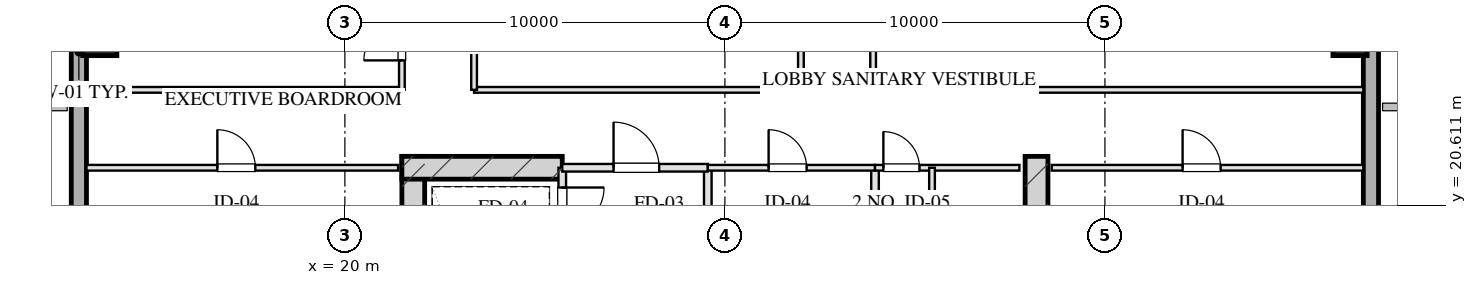
"""IFC4 building model, lengths in metres.
Left out: names, types, materials, properties, quantities, classifications, styles, units other than length and angle.
Written with IfcOpenShell. Run it as: python <this file> out.ifc"""

import sys

from ifc_helpers import new_model, si_unit, direction, frame, frame_2d, origin, origin_2d, place, context, subcontext, project, spatial, rectangle, hollow_rectangle, extrude, element, fill, save


model = new_model("IFC4")
c1 = context("Model", 3, precision=1e-05, world=origin(), true_north=direction((0.0, 1.0)))
c2 = subcontext(c1, "Body", "Model", "MODEL_VIEW")
j1 = project(units=[si_unit("LENGTHUNIT", "METRE"), si_unit("PLANEANGLEUNIT", "RADIAN")], contexts=[c1])
p1 = place(None, origin())
s1 = spatial("IfcSite", under=j1, at=p1, CompositionType="ELEMENT")
p2 = place(p1, origin())
s2 = spatial("IfcBuilding", under=s1, at=p2, CompositionType="ELEMENT")
p3 = place(p2, frame((0.0, 0.0, 163.3)))
s3 = spatial("IfcBuildingStorey", under=s2, at=p3, CompositionType="ELEMENT", Elevation=163.3)
for number, where, z_axis, x_axis in (
    (1, (21.8, 21.9, 0.0), (0.0, 0.0, 1.0), (0.0, -1.0, 0.0)),
    (2, (38.2, 21.9, 0.0), (0.0, 0.0, 1.0), (0.0, -1.0, 0.0)),
):
    element("IfcWall", number, at=place(p3, frame(where, z_axis=z_axis, x_axis=x_axis)), inside=s3, PredefinedType="SHEAR", context=c2, shape_type="SweptSolid", body=[
        extrude(rectangle(XDim=9.48, YDim=0.6, at=frame_2d((4.74, 0.0))), origin(), (0.0, 0.0, 1.0), 3.45),
    ])
p4 = place(p3, frame((21.5, 21.6, 0.0), z_axis=(0.0, 0.0, 1.0), x_axis=(1.0, 0.0, 0.0)))
e3 = element("IfcWall", 3, at=p4, inside=s3, PredefinedType="SHEAR", context=c2, shape_type="SweptSolid", body=[
    extrude(rectangle(XDim=4.22, YDim=0.6, at=frame_2d((2.11, 0.0))), origin(), (0.0, 0.0, 1.0), 3.45),
])
for number, where, z_axis, x_axis in (
    (4, (13.55, 25.0, 0.0), (0.0, 0.0, 1.0), (1.0, 0.0, 0.0)),
    (5, (46.45, 25.0, 0.0), (0.0, 0.0, 1.0), (1.0, 0.0, 0.0)),
):
    element("IfcColumn", number, at=place(p3, frame(where, z_axis=z_axis, x_axis=x_axis)), inside=s3, PredefinedType="COLUMN", context=c2, shape_type="SweptSolid", body=[
        extrude(hollow_rectangle(XDim=0.9, YDim=0.9, WallThickness=0.032, at=origin_2d()), origin(), (0.0, 0.0, 1.0), 3.451),
    ])
p5 = place(p3, frame((13.0, 10.8, 0.0), z_axis=(0.0, 0.0, 1.0), x_axis=(0.0, 1.0, 0.0)))
e6 = element("IfcWall", 6, at=p5, inside=s3, PredefinedType="SOLIDWALL", context=c2, shape_type="SweptSolid", body=[
    extrude(rectangle(XDim=46.4, YDim=0.4, at=frame_2d((23.2, 0.0))), origin(), (0.0, 0.0, 1.0), 2.61),
])
p6 = place(p5, frame((28.45, 0.0, 0.0)))
e7 = element("IfcOpeningElement", 7, at=p6, cuts=e6, PredefinedType="OPENING", context=c2, shape_type="SweptSolid", body=[
    extrude(rectangle(XDim=1.1, YDim=2.15, at=frame_2d((0.55, 1.075))), frame((0.0, 0.21, 0.0), z_axis=(0.0, -1.0, 0.0), x_axis=(1.0, 0.0, 0.0)), (0.0, 0.0, 1.0), 0.42),
])
p7 = place(p3, frame((47.0, 57.2, 0.0), z_axis=(0.0, 0.0, 1.0), x_axis=(0.0, -1.0, 0.0)))
e8 = element("IfcWall", 8, at=p7, inside=s3, PredefinedType="SOLIDWALL", context=c2, shape_type="SweptSolid", body=[
    extrude(rectangle(XDim=46.4, YDim=0.4, at=frame_2d((23.2, 0.0))), origin(), (0.0, 0.0, 1.0), 2.61),
])
p8 = place(p7, frame((28.475, 0.0, 0.75)))
e9 = element("IfcOpeningElement", 9, at=p8, cuts=e8, PredefinedType="OPENING", context=c2, shape_type="SweptSolid", body=[
    extrude(rectangle(XDim=2.25, YDim=1.46, at=frame_2d((1.125, 0.73))), frame((0.0, 0.21, 0.0), z_axis=(0.0, -1.0, 0.0), x_axis=(1.0, 0.0, 0.0)), (0.0, 0.0, 1.0), 0.42),
])
p9 = place(p7, frame((24.675, 0.0, 0.75)))
e10 = element("IfcOpeningElement", 10, at=p9, cuts=e8, PredefinedType="OPENING", context=c2, shape_type="SweptSolid", body=[
    extrude(rectangle(XDim=2.25, YDim=1.46, at=frame_2d((1.125, 0.73))), frame((0.0, 0.21, 0.0), z_axis=(0.0, -1.0, 0.0), x_axis=(1.0, 0.0, 0.0)), (0.0, 0.0, 1.0), 0.42),
])
p10 = place(p7, frame((18.25, 0.0, 0.0)))
e11 = element("IfcOpeningElement", 11, at=p10, cuts=e8, PredefinedType="OPENING", context=c2, shape_type="SweptSolid", body=[
    extrude(rectangle(XDim=1.1, YDim=2.15, at=frame_2d((0.55, 1.075))), frame((0.0, 0.21, 0.0), z_axis=(0.0, -1.0, 0.0), x_axis=(1.0, 0.0, 0.0)), (0.0, 0.0, 1.0), 0.42),
])
p11 = place(p3, frame((25.72, 21.6, 0.0), z_axis=(0.0, 0.0, 1.0), x_axis=(0.0, -1.0, 0.0)))
e12 = element("IfcWall", 12, at=p11, inside=s3, PredefinedType="PARTITIONING", context=c2, shape_type="SweptSolid", body=[
    extrude(rectangle(XDim=1.9, YDim=0.2, at=frame_2d((0.95, 0.0))), origin(), (0.0, 0.0, 1.0), 3.175),
])
p12 = place(p11, frame((0.52, 0.0, 0.0)))
e13 = element("IfcOpeningElement", 13, at=p12, cuts=e12, PredefinedType="OPENING", context=c2, shape_type="SweptSolid", body=[
    extrude(rectangle(XDim=1.1, YDim=2.05, at=frame_2d((0.55, 1.025))), frame((0.0, 0.11, 0.0), z_axis=(0.0, -1.0, 0.0), x_axis=(1.0, 0.0, 0.0)), (0.0, 0.0, 1.0), 0.22),
])
p13 = place(p3, frame((29.55, 21.6, 0.0), z_axis=(0.0, 0.0, 1.0), x_axis=(0.0, -1.0, 0.0)))
e14 = element("IfcWall", 14, at=p13, inside=s3, PredefinedType="PARTITIONING", context=c2, shape_type="SweptSolid", body=[
    extrude(rectangle(XDim=8.43, YDim=0.2, at=frame_2d((4.215, 0.0))), origin(), (0.0, 0.0, 1.0), 3.175),
])
p14 = place(p3, frame((25.72, 21.6, 0.0), z_axis=(0.0, 0.0, 1.0), x_axis=(1.0, 0.0, 0.0)))
e15 = element("IfcWall", 15, at=p14, inside=s3, PredefinedType="PARTITIONING", context=c2, shape_type="SweptSolid", body=[
    extrude(rectangle(XDim=3.83, YDim=0.2, at=frame_2d((1.915, 0.0))), origin(), (0.0, 0.0, 1.0), 3.175),
])
p15 = place(p14, frame((1.35, 0.0, 0.0)))
e16 = element("IfcOpeningElement", 16, at=p15, cuts=e15, PredefinedType="OPENING", context=c2, shape_type="SweptSolid", body=[
    extrude(rectangle(XDim=1.2, YDim=2.05, at=frame_2d((0.6, 1.025))), frame((0.0, 0.11, 0.0), z_axis=(0.0, -1.0, 0.0), x_axis=(1.0, 0.0, 0.0)), (0.0, 0.0, 1.0), 0.22),
])
p16 = place(p3, frame((33.95, 21.6, 0.0), z_axis=(0.0, 0.0, 1.0), x_axis=(0.0, -1.0, 0.0)))
e17 = element("IfcWall", 17, at=p16, inside=s3, PredefinedType="PARTITIONING", context=c2, shape_type="SweptSolid", body=[
    extrude(rectangle(XDim=8.43, YDim=0.2, at=frame_2d((4.215, 0.0))), origin(), (0.0, 0.0, 1.0), 3.175),
])
p17 = place(p3, frame((29.55, 21.6, 0.0), z_axis=(0.0, 0.0, 1.0), x_axis=(1.0, 0.0, 0.0)))
e18 = element("IfcWall", 18, at=p17, inside=s3, PredefinedType="PARTITIONING", context=c2, shape_type="SweptSolid", body=[
    extrude(rectangle(XDim=4.4, YDim=0.15, at=frame_2d((2.2, 0.0))), origin(), (0.0, 0.0, 1.0), 3.175),
])
p18 = place(p17, frame((1.6, 0.0, 0.0)))
e19 = element("IfcOpeningElement", 19, at=p18, cuts=e18, PredefinedType="OPENING", context=c2, shape_type="SweptSolid", body=[
    extrude(rectangle(XDim=1.0, YDim=2.05, at=frame_2d((0.5, 1.025))), frame((0.0, 0.085, 0.0), z_axis=(0.0, -1.0, 0.0), x_axis=(1.0, 0.0, 0.0)), (0.0, 0.0, 1.0), 0.17),
])
p19 = place(p3, frame((33.95, 21.6, 0.0), z_axis=(0.0, 0.0, 1.0), x_axis=(1.0, 0.0, 0.0)))
e20 = element("IfcWall", 20, at=p19, inside=s3, PredefinedType="PARTITIONING", context=c2, shape_type="SweptSolid", body=[
    extrude(rectangle(XDim=3.8, YDim=0.15, at=frame_2d((1.9, 0.0))), origin(), (0.0, 0.0, 1.0), 3.175),
])
p20 = place(p19, frame((0.22, 0.0, 0.0)))
e21 = element("IfcOpeningElement", 21, at=p20, cuts=e20, PredefinedType="OPENING", context=c2, shape_type="SweptSolid", body=[
    extrude(rectangle(XDim=0.95, YDim=2.05, at=frame_2d((0.475, 1.025))), frame((0.0, 0.085, 0.0), z_axis=(0.0, -1.0, 0.0), x_axis=(1.0, 0.0, 0.0)), (0.0, 0.0, 1.0), 0.17),
])
p21 = place(p3, frame((35.45, 21.6, 0.0), z_axis=(0.0, 0.0, 1.0), x_axis=(0.0, -1.0, 0.0)))
e22 = element("IfcWall", 22, at=p21, inside=s3, PredefinedType="PARTITIONING", context=c2, shape_type="SweptSolid", body=[
    extrude(rectangle(XDim=8.43, YDim=0.15, at=frame_2d((4.215, 0.0))), origin(), (0.0, 0.0, 1.0), 2.815),
])
p22 = place(p21, frame((2.55, 0.0, 0.0)))
e23 = element("IfcOpeningElement", 23, at=p22, cuts=e22, PredefinedType="OPENING", context=c2, shape_type="SweptSolid", body=[
    extrude(rectangle(XDim=0.95, YDim=2.05, at=frame_2d((0.475, 1.025))), frame((0.0, 0.085, 0.0), z_axis=(0.0, -1.0, 0.0), x_axis=(1.0, 0.0, 0.0)), (0.0, 0.0, 1.0), 0.17),
])
p23 = place(p21, frame((4.7, 0.0, 0.0)))
e24 = element("IfcOpeningElement", 24, at=p23, cuts=e22, PredefinedType="OPENING", context=c2, shape_type="SweptSolid", body=[
    extrude(rectangle(XDim=0.9, YDim=2.05, at=frame_2d((0.45, 1.025))), frame((0.0, 0.085, 0.0), z_axis=(0.0, -1.0, 0.0), x_axis=(1.0, 0.0, 0.0)), (0.0, 0.0, 1.0), 0.17),
])
p24 = place(p21, frame((6.8, 0.0, 0.0)))
e25 = element("IfcOpeningElement", 25, at=p24, cuts=e22, PredefinedType="OPENING", context=c2, shape_type="SweptSolid", body=[
    extrude(rectangle(XDim=0.9, YDim=2.05, at=frame_2d((0.45, 1.025))), frame((0.0, 0.085, 0.0), z_axis=(0.0, -1.0, 0.0), x_axis=(1.0, 0.0, 0.0)), (0.0, 0.0, 1.0), 0.17),
])
p25 = place(p3, frame((13.2, 21.6, 0.0), z_axis=(0.0, 0.0, 1.0), x_axis=(1.0, 0.0, 0.0)))
e26 = element("IfcWall", 26, at=p25, inside=s3, PredefinedType="PARTITIONING", context=c2, shape_type="SweptSolid", body=[
    extrude(rectangle(XDim=8.2, YDim=0.15, at=frame_2d((4.1, 0.0))), origin(), (0.0, 0.0, 1.0), 3.175),
])
p26 = place(p25, frame((3.444, 0.0, 0.0)))
e27 = element("IfcOpeningElement", 27, at=p26, cuts=e26, PredefinedType="OPENING", context=c2, shape_type="SweptSolid", body=[
    extrude(rectangle(XDim=1.0, YDim=2.05, at=frame_2d((0.5, 1.025))), frame((0.0, 0.085, 0.0), z_axis=(0.0, -1.0, 0.0), x_axis=(1.0, 0.0, 0.0)), (0.0, 0.0, 1.0), 0.17),
])
p27 = place(p3, frame((38.6, 21.6, 0.0), z_axis=(0.0, 0.0, 1.0), x_axis=(1.0, 0.0, 0.0)))
e28 = element("IfcWall", 28, at=p27, inside=s3, PredefinedType="PARTITIONING", context=c2, shape_type="SweptSolid", body=[
    extrude(rectangle(XDim=8.2, YDim=0.15, at=frame_2d((4.1, 0.0))), origin(), (0.0, 0.0, 1.0), 3.175),
])
p28 = place(p27, frame((3.444, 0.0, 0.0)))
e29 = element("IfcOpeningElement", 29, at=p28, cuts=e28, PredefinedType="OPENING", context=c2, shape_type="SweptSolid", body=[
    extrude(rectangle(XDim=1.0, YDim=2.05, at=frame_2d((0.5, 1.025))), frame((0.0, 0.085, 0.0), z_axis=(0.0, -1.0, 0.0), x_axis=(1.0, 0.0, 0.0)), (0.0, 0.0, 1.0), 0.17),
])
p29 = place(p3, frame((13.2, 23.65, 0.0), z_axis=(0.0, 0.0, 1.0), x_axis=(1.0, 0.0, 0.0)))
e30 = element("IfcWall", 30, at=p29, inside=s3, PredefinedType="PARTITIONING", context=c2, shape_type="SweptSolid", body=[
    extrude(rectangle(XDim=8.3, YDim=0.15, at=frame_2d((4.15, 0.0))), origin(), (0.0, 0.0, 1.0), 3.175),
])
p30 = place(p3, frame((23.4, 23.65, 0.0), z_axis=(0.0, 0.0, 1.0), x_axis=(1.0, 0.0, 0.0)))
e31 = element("IfcWall", 31, at=p30, inside=s3, PredefinedType="PARTITIONING", context=c2, shape_type="SweptSolid", body=[
    extrude(rectangle(XDim=8.6, YDim=0.15, at=frame_2d((4.3, 0.0))), origin(), (0.0, 0.0, 1.0), 3.175),
])
p31 = place(p3, frame((33.9, 23.65, 0.0), z_axis=(0.0, 0.0, 1.0), x_axis=(1.0, 0.0, 0.0)))
e32 = element("IfcWall", 32, at=p31, inside=s3, PredefinedType="PARTITIONING", context=c2, shape_type="SweptSolid", body=[
    extrude(rectangle(XDim=12.9, YDim=0.15, at=frame_2d((6.45, 0.0))), origin(), (0.0, 0.0, 1.0), 3.175),
])
p32 = place(p3, frame((21.5, 23.65, 0.0), z_axis=(0.0, 0.0, 1.0), x_axis=(0.0, 1.0, 0.0)))
e33 = element("IfcWall", 33, at=p32, inside=s3, PredefinedType="PARTITIONING", context=c2, shape_type="SweptSolid", body=[
    extrude(rectangle(XDim=20.7, YDim=0.15, at=frame_2d((10.35, 0.0))), origin(), (0.0, 0.0, 1.0), 3.175),
])
p33 = place(p32, frame((0.775, 0.0, 0.0)))
e34 = element("IfcOpeningElement", 34, at=p33, cuts=e33, PredefinedType="OPENING", context=c2, shape_type="SweptSolid", body=[
    extrude(rectangle(XDim=1.0, YDim=2.05, at=frame_2d((0.5, 1.025))), frame((0.0, 0.085, 0.0), z_axis=(0.0, -1.0, 0.0), x_axis=(1.0, 0.0, 0.0)), (0.0, 0.0, 1.0), 0.17),
])
p34 = place(p32, frame((3.95, 0.0, 0.0)))
e35 = element("IfcOpeningElement", 35, at=p34, cuts=e33, PredefinedType="OPENING", context=c2, shape_type="SweptSolid", body=[
    extrude(rectangle(XDim=1.0, YDim=2.05, at=frame_2d((0.5, 1.025))), frame((0.0, 0.085, 0.0), z_axis=(0.0, -1.0, 0.0), x_axis=(1.0, 0.0, 0.0)), (0.0, 0.0, 1.0), 0.17),
])
p35 = place(p32, frame((7.51, 0.0, 0.0)))
e36 = element("IfcOpeningElement", 36, at=p35, cuts=e33, PredefinedType="OPENING", context=c2, shape_type="SweptSolid", body=[
    extrude(rectangle(XDim=1.0, YDim=2.05, at=frame_2d((0.5, 1.025))), frame((0.0, 0.085, 0.0), z_axis=(0.0, -1.0, 0.0), x_axis=(1.0, 0.0, 0.0)), (0.0, 0.0, 1.0), 0.17),
])
p36 = place(p32, frame((11.51, 0.0, 0.0)))
e37 = element("IfcOpeningElement", 37, at=p36, cuts=e33, PredefinedType="OPENING", context=c2, shape_type="SweptSolid", body=[
    extrude(rectangle(XDim=0.85, YDim=2.05, at=frame_2d((0.425, 1.025))), frame((0.0, 0.085, 0.0), z_axis=(0.0, -1.0, 0.0), x_axis=(1.0, 0.0, 0.0)), (0.0, 0.0, 1.0), 0.17),
])
p37 = place(p32, frame((15.75, 0.0, 0.0)))
e38 = element("IfcOpeningElement", 38, at=p37, cuts=e33, PredefinedType="OPENING", context=c2, shape_type="SweptSolid", body=[
    extrude(rectangle(XDim=1.0, YDim=2.05, at=frame_2d((0.5, 1.025))), frame((0.0, 0.085, 0.0), z_axis=(0.0, -1.0, 0.0), x_axis=(1.0, 0.0, 0.0)), (0.0, 0.0, 1.0), 0.17),
])
p38 = place(p32, frame((18.925, 0.0, 0.0)))
e39 = element("IfcOpeningElement", 39, at=p38, cuts=e33, PredefinedType="OPENING", context=c2, shape_type="SweptSolid", body=[
    extrude(rectangle(XDim=1.05, YDim=2.05, at=frame_2d((0.525, 1.025))), frame((0.0, 0.085, 0.0), z_axis=(0.0, -1.0, 0.0), x_axis=(1.0, 0.0, 0.0)), (0.0, 0.0, 1.0), 0.17),
])
p39 = place(p3, frame((23.4, 23.65, 0.0), z_axis=(0.0, 0.0, 1.0), x_axis=(0.0, 1.0, 0.0)))
e40 = element("IfcWall", 40, at=p39, inside=s3, PredefinedType="PARTITIONING", context=c2, shape_type="SweptSolid", body=[
    extrude(rectangle(XDim=20.7, YDim=0.15, at=frame_2d((10.35, 0.0))), origin(), (0.0, 0.0, 1.0), 3.175),
])
p40 = place(p39, frame((4.117, 0.0, 0.0)))
e41 = element("IfcOpeningElement", 41, at=p40, cuts=e40, PredefinedType="OPENING", context=c2, shape_type="SweptSolid", body=[
    extrude(rectangle(XDim=1.1, YDim=2.05, at=frame_2d((0.55, 1.025))), frame((0.0, 0.085, 0.0), z_axis=(0.0, -1.0, 0.0), x_axis=(1.0, 0.0, 0.0)), (0.0, 0.0, 1.0), 0.17),
])
p41 = place(p39, frame((14.347, 0.0, 0.0)))
e42 = element("IfcOpeningElement", 42, at=p41, cuts=e40, PredefinedType="OPENING", context=c2, shape_type="SweptSolid", body=[
    extrude(rectangle(XDim=1.1, YDim=2.05, at=frame_2d((0.55, 1.025))), frame((0.0, 0.085, 0.0), z_axis=(0.0, -1.0, 0.0), x_axis=(1.0, 0.0, 0.0)), (0.0, 0.0, 1.0), 0.17),
])
p42 = place(p3, frame((32.0, 23.65, 0.0), z_axis=(0.0, 0.0, 1.0), x_axis=(0.0, 1.0, 0.0)))
e43 = element("IfcWall", 43, at=p42, inside=s3, PredefinedType="PARTITIONING", context=c2, shape_type="SweptSolid", body=[
    extrude(rectangle(XDim=20.7, YDim=0.15, at=frame_2d((10.35, 0.0))), origin(), (0.0, 0.0, 1.0), 3.175),
])
p43 = place(p3, frame((33.9, 23.65, 0.0), z_axis=(0.0, 0.0, 1.0), x_axis=(0.0, 1.0, 0.0)))
e44 = element("IfcWall", 44, at=p43, inside=s3, PredefinedType="PARTITIONING", context=c2, shape_type="SweptSolid", body=[
    extrude(rectangle(XDim=20.7, YDim=0.15, at=frame_2d((10.35, 0.0))), origin(), (0.0, 0.0, 1.0), 3.175),
])
p44 = place(p43, frame((2.329, 0.0, 0.0)))
e45 = element("IfcOpeningElement", 45, at=p44, cuts=e44, PredefinedType="OPENING", context=c2, shape_type="SweptSolid", body=[
    extrude(rectangle(XDim=1.0, YDim=2.05, at=frame_2d((0.5, 1.025))), frame((0.0, 0.085, 0.0), z_axis=(0.0, -1.0, 0.0), x_axis=(1.0, 0.0, 0.0)), (0.0, 0.0, 1.0), 0.17),
])
p45 = place(p43, frame((8.104, 0.0, 0.0)))
e46 = element("IfcOpeningElement", 46, at=p45, cuts=e44, PredefinedType="OPENING", context=c2, shape_type="SweptSolid", body=[
    extrude(rectangle(XDim=1.0, YDim=2.05, at=frame_2d((0.5, 1.025))), frame((0.0, 0.085, 0.0), z_axis=(0.0, -1.0, 0.0), x_axis=(1.0, 0.0, 0.0)), (0.0, 0.0, 1.0), 0.17),
])
p46 = place(p43, frame((14.35, 0.0, 0.0)))
e47 = element("IfcOpeningElement", 47, at=p46, cuts=e44, PredefinedType="OPENING", context=c2, shape_type="SweptSolid", body=[
    extrude(rectangle(XDim=1.0, YDim=2.05, at=frame_2d((0.5, 1.025))), frame((0.0, 0.085, 0.0), z_axis=(0.0, -1.0, 0.0), x_axis=(1.0, 0.0, 0.0)), (0.0, 0.0, 1.0), 0.17),
])
p47 = place(p43, frame((18.925, 0.0, 0.0)))
e48 = element("IfcOpeningElement", 48, at=p47, cuts=e44, PredefinedType="OPENING", context=c2, shape_type="SweptSolid", body=[
    extrude(rectangle(XDim=1.0, YDim=2.05, at=frame_2d((0.5, 1.025))), frame((0.0, 0.085, 0.0), z_axis=(0.0, -1.0, 0.0), x_axis=(1.0, 0.0, 0.0)), (0.0, 0.0, 1.0), 0.17),
])
p48 = place(p12, origin())
e49 = element("IfcDoor", 49, at=p48, inside=s3, OperationType="SINGLE_SWING_LEFT", PredefinedType="DOOR", context=c2, shape_type="SweptSolid", body=[
    extrude(rectangle(XDim=1.1, YDim=2.05, at=frame_2d((0.55, 1.025))), frame((0.0, 0.025, 0.0), z_axis=(0.0, -1.0, 0.0), x_axis=(1.0, 0.0, 0.0)), (0.0, 0.0, 1.0), 0.05),
])
fill(e13, e49)
p49 = place(p15, origin())
e50 = element("IfcDoor", 50, at=p49, inside=s3, OperationType="SINGLE_SWING_LEFT", PredefinedType="DOOR", context=c2, shape_type="SweptSolid", body=[
    extrude(rectangle(XDim=1.2, YDim=2.05, at=frame_2d((0.6, 1.025))), frame((0.0, 0.025, 0.0), z_axis=(0.0, -1.0, 0.0), x_axis=(1.0, 0.0, 0.0)), (0.0, 0.0, 1.0), 0.05),
])
fill(e16, e50)
p50 = place(p18, origin())
e51 = element("IfcDoor", 51, at=p50, inside=s3, OperationType="SINGLE_SWING_LEFT", PredefinedType="DOOR", context=c2, shape_type="SweptSolid", body=[
    extrude(rectangle(XDim=1.0, YDim=2.05, at=frame_2d((0.5, 1.025))), frame((0.0, 0.025, 0.0), z_axis=(0.0, -1.0, 0.0), x_axis=(1.0, 0.0, 0.0)), (0.0, 0.0, 1.0), 0.05),
])
fill(e19, e51)
p51 = place(p20, origin())
e52 = element("IfcDoor", 52, at=p51, inside=s3, OperationType="SINGLE_SWING_LEFT", PredefinedType="DOOR", context=c2, shape_type="SweptSolid", body=[
    extrude(rectangle(XDim=0.95, YDim=2.05, at=frame_2d((0.475, 1.025))), frame((0.0, 0.025, 0.0), z_axis=(0.0, -1.0, 0.0), x_axis=(1.0, 0.0, 0.0)), (0.0, 0.0, 1.0), 0.05),
])
fill(e21, e52)
p52 = place(p26, origin())
e53 = element("IfcDoor", 53, at=p52, inside=s3, OperationType="SINGLE_SWING_LEFT", PredefinedType="DOOR", context=c2, shape_type="SweptSolid", body=[
    extrude(rectangle(XDim=1.0, YDim=2.05, at=frame_2d((0.5, 1.025))), frame((0.0, 0.025, 0.0), z_axis=(0.0, -1.0, 0.0), x_axis=(1.0, 0.0, 0.0)), (0.0, 0.0, 1.0), 0.05),
])
fill(e27, e53)
p53 = place(p28, origin())
e54 = element("IfcDoor", 54, at=p53, inside=s3, OperationType="SINGLE_SWING_LEFT", PredefinedType="DOOR", context=c2, shape_type="SweptSolid", body=[
    extrude(rectangle(XDim=1.0, YDim=2.05, at=frame_2d((0.5, 1.025))), frame((0.0, 0.025, 0.0), z_axis=(0.0, -1.0, 0.0), x_axis=(1.0, 0.0, 0.0)), (0.0, 0.0, 1.0), 0.05),
])
fill(e29, e54)
p54 = place(p33, origin())
e55 = element("IfcDoor", 55, at=p54, inside=s3, OperationType="SINGLE_SWING_LEFT", PredefinedType="DOOR", context=c2, shape_type="SweptSolid", body=[
    extrude(rectangle(XDim=1.0, YDim=2.05, at=frame_2d((0.5, 1.025))), frame((0.0, 0.025, 0.0), z_axis=(0.0, -1.0, 0.0), x_axis=(1.0, 0.0, 0.0)), (0.0, 0.0, 1.0), 0.05),
])
fill(e34, e55)
save(model, sys.argv[1])
